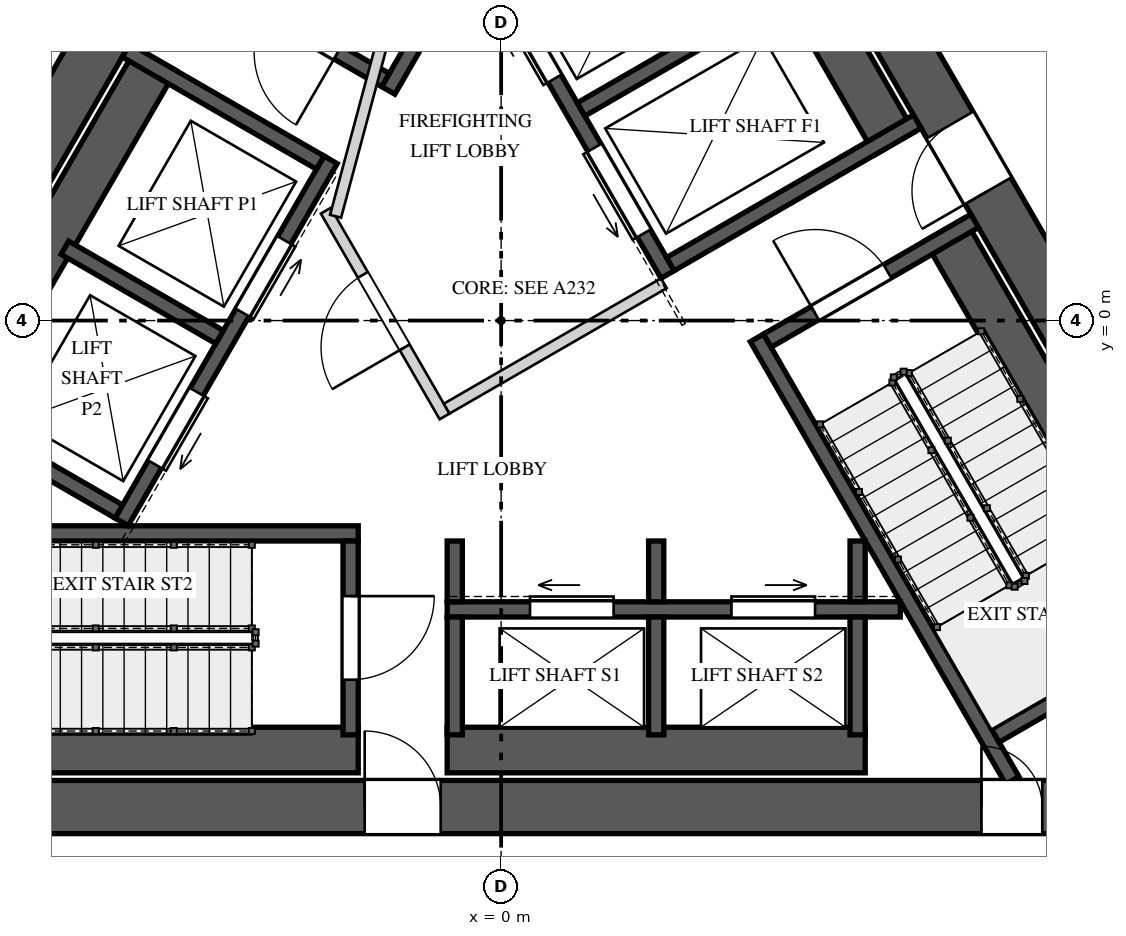
"""IFC4 building model, lengths in metres.
Left out: names, types, materials, properties, quantities, classifications, styles, units other than length and angle.
Written with IfcOpenShell. Run it as: python <this file> out.ifc"""

import sys

from ifc_helpers import new_model, si_unit, direction, frame, frame_2d, origin, place, context, subcontext, project, spatial, rectangle, extrude, element, fill, save


model = new_model("IFC4")
c1 = context("Model", 3, precision=1e-05, world=origin(), true_north=direction((0.0, 1.0)))
c2 = subcontext(c1, "Body", "Model", "MODEL_VIEW")
j1 = project(units=[si_unit("LENGTHUNIT", "METRE"), si_unit("PLANEANGLEUNIT", "RADIAN")], contexts=[c1])
p1 = place(None, origin())
s1 = spatial("IfcSite", under=j1, at=p1, CompositionType="ELEMENT")
p2 = place(p1, origin())
s2 = spatial("IfcBuilding", under=s1, at=p2, CompositionType="ELEMENT")
p3 = place(p2, frame((0.0, 0.0, 237.2)))
s3 = spatial("IfcBuildingStorey", under=s2, at=p3, CompositionType="ELEMENT", Elevation=237.2)
p4 = place(p3, frame((-1.241, 10.65, 0.0), z_axis=(0.0, 0.0, 1.0), x_axis=(-0.500003331888, -0.866023480109, 0.0)))
e1 = element("IfcWall", 1, at=p4, inside=s3, PredefinedType="SHEAR", context=c2, shape_type="SweptSolid", body=[
    extrude(rectangle(XDim=17.205, YDim=0.7, at=frame_2d((8.603, 0.0))), origin(), (0.0, 0.0, 1.0), 4.0),
])
p5 = place(p4, frame((6.808, 0.0, 0.0)))
e2 = element("IfcOpeningElement", 2, at=p5, cuts=e1, PredefinedType="OPENING", context=c2, shape_type="SweptSolid", body=[
    extrude(rectangle(XDim=1.0, YDim=2.4, at=frame_2d((0.5, 1.2))), frame((0.0, 0.36, 0.0), z_axis=(0.0, -1.0, 0.0), x_axis=(1.0, 0.0, 0.0)), (0.0, 0.0, 1.0), 0.72),
])
p6 = place(p4, frame((14.922, 0.0, 0.0)))
e3 = element("IfcOpeningElement", 3, at=p6, cuts=e1, PredefinedType="OPENING", context=c2, shape_type="SweptSolid", body=[
    extrude(rectangle(XDim=0.8, YDim=2.1, at=frame_2d((0.4, 1.05))), frame((0.0, 0.36, 0.0), z_axis=(0.0, -1.0, 0.0), x_axis=(1.0, 0.0, 0.0)), (0.0, 0.0, 1.0), 0.72),
])
p7 = place(p3, frame((-8.603, -6.4, 0.0), z_axis=(0.0, 0.0, 1.0), x_axis=(1.0, 0.0, 0.0)))
e4 = element("IfcWall", 4, at=p7, inside=s3, PredefinedType="SHEAR", context=c2, shape_type="SweptSolid", body=[
    extrude(rectangle(XDim=17.205, YDim=0.7, at=frame_2d((8.603, 0.0))), origin(), (0.0, 0.0, 1.0), 4.0),
])
p8 = place(p7, frame((6.808, 0.0, 0.0)))
e5 = element("IfcOpeningElement", 5, at=p8, cuts=e4, PredefinedType="OPENING", context=c2, shape_type="SweptSolid", body=[
    extrude(rectangle(XDim=1.0, YDim=2.4, at=frame_2d((0.5, 1.2))), frame((0.0, 0.36, 0.0), z_axis=(0.0, -1.0, 0.0), x_axis=(1.0, 0.0, 0.0)), (0.0, 0.0, 1.0), 0.72),
])
p9 = place(p7, frame((14.922, 0.0, 0.0)))
e6 = element("IfcOpeningElement", 6, at=p9, cuts=e4, PredefinedType="OPENING", context=c2, shape_type="SweptSolid", body=[
    extrude(rectangle(XDim=0.8, YDim=2.1, at=frame_2d((0.4, 1.05))), frame((0.0, 0.36, 0.0), z_axis=(0.0, -1.0, 0.0), x_axis=(1.0, 0.0, 0.0)), (0.0, 0.0, 1.0), 0.72),
])
p10 = place(p3, frame((9.844, -4.25, 0.0), z_axis=(0.0, 0.0, 1.0), x_axis=(-0.500003331888, 0.866023480109, 0.0)))
e7 = element("IfcWall", 7, at=p10, inside=s3, PredefinedType="SHEAR", context=c2, shape_type="SweptSolid", body=[
    extrude(rectangle(XDim=17.205, YDim=0.7, at=frame_2d((8.603, 0.0))), origin(), (0.0, 0.0, 1.0), 4.0),
])
p11 = place(p10, frame((6.877, 0.0, 0.0)))
e8 = element("IfcOpeningElement", 8, at=p11, cuts=e7, PredefinedType="OPENING", context=c2, shape_type="SweptSolid", body=[
    extrude(rectangle(XDim=1.0, YDim=2.4, at=frame_2d((0.5, 1.2))), frame((0.0, 0.36, 0.0), z_axis=(0.0, -1.0, 0.0), x_axis=(1.0, 0.0, 0.0)), (0.0, 0.0, 1.0), 0.72),
])
p12 = place(p3, frame((1.876, 8.85, 0.0), z_axis=(0.0, 0.0, 1.0), x_axis=(-0.499998042495, -0.866026533947, 0.0)))
e9 = element("IfcWall", 9, at=p12, inside=s3, PredefinedType="SOLIDWALL", context=c2, shape_type="SweptSolid", body=[
    extrude(rectangle(XDim=6.723, YDim=0.2, at=frame_2d((3.361, 0.0))), origin(), (0.0, 0.0, 1.0), 3.65),
])
p13 = place(p3, frame((-1.521, 3.165, 0.0), z_axis=(0.0, 0.0, 1.0), x_axis=(-0.866035871367, 0.499981869177, 0.0)))
e10 = element("IfcWall", 10, at=p13, inside=s3, PredefinedType="SOLIDWALL", context=c2, shape_type="SweptSolid", body=[
    extrude(rectangle(XDim=3.15, YDim=0.2, at=frame_2d((1.575, 0.0))), origin(), (0.0, 0.0, 1.0), 3.65),
])
p14 = place(p13, frame((0.725, 0.0, 0.0)))
e11 = element("IfcOpeningElement", 11, at=p14, cuts=e10, PredefinedType="OPENING", context=c2, shape_type="SweptSolid", body=[
    extrude(rectangle(XDim=1.1, YDim=2.4, at=frame_2d((0.55, 1.2))), frame((0.0, 0.11, 0.0), z_axis=(0.0, -1.0, 0.0), x_axis=(1.0, 0.0, 0.0)), (0.0, 0.0, 1.0), 0.22),
])
p15 = place(p3, frame((-8.08, -5.65, 0.0), z_axis=(0.0, 0.0, 1.0), x_axis=(1.0, 0.0, 0.0)))
e12 = element("IfcWall", 12, at=p15, inside=s3, PredefinedType="SOLIDWALL", context=c2, shape_type="SweptSolid", body=[
    extrude(rectangle(XDim=6.2, YDim=0.6, at=frame_2d((3.1, 0.0))), origin(), (0.0, 0.0, 1.0), 3.65),
])
p16 = place(p3, frame((-8.603, -2.8, 0.0), z_axis=(0.0, 0.0, 1.0), x_axis=(1.0, 0.0, 0.0)))
e13 = element("IfcWall", 13, at=p16, inside=s3, PredefinedType="SOLIDWALL", context=c2, shape_type="SweptSolid", body=[
    extrude(rectangle(XDim=6.723, YDim=0.2, at=frame_2d((3.361, 0.0))), origin(), (0.0, 0.0, 1.0), 3.65),
])
p17 = place(p3, frame((-1.98, -2.9, 0.0), z_axis=(0.0, 0.0, 1.0), x_axis=(0.0, -1.0, 0.0)))
e14 = element("IfcWall", 14, at=p17, inside=s3, PredefinedType="SOLIDWALL", context=c2, shape_type="SweptSolid", body=[
    extrude(rectangle(XDim=2.55, YDim=0.2, at=frame_2d((1.275, 0.0))), origin(), (0.0, 0.0, 1.0), 3.65),
])
p18 = place(p17, frame((0.725, 0.0, 0.0)))
e15 = element("IfcOpeningElement", 15, at=p18, cuts=e14, PredefinedType="OPENING", context=c2, shape_type="SweptSolid", body=[
    extrude(rectangle(XDim=1.1, YDim=2.4, at=frame_2d((0.55, 1.2))), frame((0.0, 0.11, 0.0), z_axis=(0.0, -1.0, 0.0), x_axis=(1.0, 0.0, 0.0)), (0.0, 0.0, 1.0), 0.22),
])
p19 = place(p3, frame((8.933, -4.172, 0.0), z_axis=(0.0, 0.0, 1.0), x_axis=(-0.500026960575, 0.86600983753, 0.0)))
e16 = element("IfcWall", 16, at=p19, inside=s3, PredefinedType="SOLIDWALL", context=c2, shape_type="SweptSolid", body=[
    extrude(rectangle(XDim=6.2, YDim=0.6, at=frame_2d((3.1, 0.0))), origin(), (0.0, 0.0, 1.0), 3.65),
])
p20 = place(p3, frame((6.726, -6.05, 0.0), z_axis=(0.0, 0.0, 1.0), x_axis=(-0.499970804718, 0.866042259032, 0.0)))
e17 = element("IfcWall", 17, at=p20, inside=s3, PredefinedType="SOLIDWALL", context=c2, shape_type="SweptSolid", body=[
    extrude(rectangle(XDim=6.723, YDim=0.2, at=frame_2d((3.361, 0.0))), origin(), (0.0, 0.0, 1.0), 3.65),
])
p21 = place(p3, frame((6.501, -5.461, 0.0), z_axis=(0.0, 0.0, 1.0), x_axis=(0.866035871367, 0.499981869177, 0.0)))
e18 = element("IfcWall", 18, at=p21, inside=s3, PredefinedType="SOLIDWALL", context=c2, shape_type="SweptSolid", body=[
    extrude(rectangle(XDim=3.15, YDim=0.2, at=frame_2d((1.575, 0.0))), origin(), (0.0, 0.0, 1.0), 3.65),
])
p22 = place(p3, frame((3.501, -0.265, 0.0), z_axis=(0.0, 0.0, 1.0), x_axis=(0.866035871367, 0.499981869177, 0.0)))
e19 = element("IfcWall", 19, at=p22, inside=s3, PredefinedType="SOLIDWALL", context=c2, shape_type="SweptSolid", body=[
    extrude(rectangle(XDim=3.15, YDim=0.2, at=frame_2d((1.575, 0.0))), origin(), (0.0, 0.0, 1.0), 3.65),
])
p23 = place(p22, frame((0.725, 0.0, 0.0)))
e20 = element("IfcOpeningElement", 20, at=p23, cuts=e19, PredefinedType="OPENING", context=c2, shape_type="SweptSolid", body=[
    extrude(rectangle(XDim=1.1, YDim=2.4, at=frame_2d((0.55, 1.2))), frame((0.0, 0.11, 0.0), z_axis=(0.0, -1.0, 0.0), x_axis=(1.0, 0.0, 0.0)), (0.0, 0.0, 1.0), 0.22),
])
p24 = place(p3, frame((-2.243, 2.115, 0.0), z_axis=(0.0, 0.0, 1.0), x_axis=(-0.499996545922, -0.866027397988, 0.0)))
e21 = element("IfcWall", 21, at=p24, inside=s3, PredefinedType="SOLIDWALL", context=c2, shape_type="SweptSolid", body=[
    extrude(rectangle(XDim=5.5, YDim=0.2, at=frame_2d((2.75, 0.0))), origin(), (0.0, 0.0, 1.0), 3.65),
])
p25 = place(p24, frame((1.22, 0.0, 0.0)))
e22 = element("IfcOpeningElement", 22, at=p25, cuts=e21, PredefinedType="OPENING", context=c2, shape_type="SweptSolid", body=[
    extrude(rectangle(XDim=1.1, YDim=2.1, at=frame_2d((0.55, 1.05))), frame((0.0, 0.11, 0.0), z_axis=(0.0, -1.0, 0.0), x_axis=(1.0, 0.0, 0.0)), (0.0, 0.0, 1.0), 0.22),
])
p26 = place(p24, frame((3.525, 0.0, 0.0)))
e23 = element("IfcOpeningElement", 23, at=p26, cuts=e21, PredefinedType="OPENING", context=c2, shape_type="SweptSolid", body=[
    extrude(rectangle(XDim=1.1, YDim=2.1, at=frame_2d((0.55, 1.05))), frame((0.0, 0.11, 0.0), z_axis=(0.0, -1.0, 0.0), x_axis=(1.0, 0.0, 0.0)), (0.0, 0.0, 1.0), 0.22),
])
p27 = place(p3, frame((-4.538, 3.44, 0.0), z_axis=(0.0, 0.0, 1.0), x_axis=(-0.499996545922, -0.866027397988, 0.0)))
e24 = element("IfcWall", 24, at=p27, inside=s3, PredefinedType="SOLIDWALL", context=c2, shape_type="SweptSolid", body=[
    extrude(rectangle(XDim=5.5, YDim=0.6, at=frame_2d((2.75, 0.0))), origin(), (0.0, 0.0, 1.0), 3.65),
])
p28 = place(p3, frame((-2.38, 2.078, 0.0), z_axis=(0.0, 0.0, 1.0), x_axis=(-0.866060182126, 0.499939757307, 0.0)))
e25 = element("IfcWall", 25, at=p28, inside=s3, PredefinedType="SOLIDWALL", context=c2, shape_type="SweptSolid", body=[
    extrude(rectangle(XDim=2.95, YDim=0.2, at=frame_2d((1.475, 0.0))), origin(), (0.0, 0.0, 1.0), 3.65),
])
p29 = place(p3, frame((-3.705, -0.217, 0.0), z_axis=(0.0, 0.0, 1.0), x_axis=(-0.866016039709, 0.500016218704, 0.0)))
e26 = element("IfcWall", 26, at=p29, inside=s3, PredefinedType="SOLIDWALL", context=c2, shape_type="SweptSolid", body=[
    extrude(rectangle(XDim=2.35, YDim=0.2, at=frame_2d((1.175, 0.0))), origin(), (0.0, 0.0, 1.0), 3.65),
])
p30 = place(p3, frame((-5.03, -2.512, 0.0), z_axis=(0.0, 0.0, 1.0), x_axis=(-0.866003658127, 0.500037662692, 0.0)))
e27 = element("IfcWall", 27, at=p30, inside=s3, PredefinedType="SOLIDWALL", context=c2, shape_type="SweptSolid", body=[
    extrude(rectangle(XDim=2.95, YDim=0.2, at=frame_2d((1.475, 0.0))), origin(), (0.0, 0.0, 1.0), 3.65),
])
p31 = place(p3, frame((-0.71, -3.8, 0.0), z_axis=(0.0, 0.0, 1.0), x_axis=(1.0, 0.0, 0.0)))
e28 = element("IfcWall", 28, at=p31, inside=s3, PredefinedType="SOLIDWALL", context=c2, shape_type="SweptSolid", body=[
    extrude(rectangle(XDim=5.961, YDim=0.2, at=frame_2d((2.981, 0.0))), origin(), (0.0, 0.0, 1.0), 3.65),
])
p32 = place(p31, frame((1.09, 0.0, 0.0)))
e29 = element("IfcOpeningElement", 29, at=p32, cuts=e28, PredefinedType="OPENING", context=c2, shape_type="SweptSolid", body=[
    extrude(rectangle(XDim=1.1, YDim=2.1, at=frame_2d((0.55, 1.05))), frame((0.0, 0.11, 0.0), z_axis=(0.0, -1.0, 0.0), x_axis=(1.0, 0.0, 0.0)), (0.0, 0.0, 1.0), 0.22),
])
p33 = place(p31, frame((3.74, 0.0, 0.0)))
e30 = element("IfcOpeningElement", 30, at=p33, cuts=e28, PredefinedType="OPENING", context=c2, shape_type="SweptSolid", body=[
    extrude(rectangle(XDim=1.1, YDim=2.1, at=frame_2d((0.55, 1.05))), frame((0.0, 0.11, 0.0), z_axis=(0.0, -1.0, 0.0), x_axis=(1.0, 0.0, 0.0)), (0.0, 0.0, 1.0), 0.22),
])
p34 = place(p3, frame((-0.71, -5.65, 0.0), z_axis=(0.0, 0.0, 1.0), x_axis=(1.0, 0.0, 0.0)))
e31 = element("IfcWall", 31, at=p34, inside=s3, PredefinedType="SOLIDWALL", context=c2, shape_type="SweptSolid", body=[
    extrude(rectangle(XDim=5.5, YDim=0.6, at=frame_2d((2.75, 0.0))), origin(), (0.0, 0.0, 1.0), 3.65),
])
p35 = place(p3, frame((-0.61, -3.9, 0.0), z_axis=(0.0, 0.0, 1.0), x_axis=(0.0, -1.0, 0.0)))
e32 = element("IfcWall", 32, at=p35, inside=s3, PredefinedType="SOLIDWALL", context=c2, shape_type="SweptSolid", body=[
    extrude(rectangle(XDim=1.55, YDim=0.2, at=frame_2d((0.775, 0.0))), origin(), (0.0, 0.0, 1.0), 3.65),
])
p36 = place(p3, frame((-0.61, -2.9, 0.0), z_axis=(0.0, 0.0, 1.0), x_axis=(0.0, -1.0, 0.0)))
e33 = element("IfcWall", 33, at=p36, inside=s3, PredefinedType="SOLIDWALL", context=c2, shape_type="SweptSolid", body=[
    extrude(rectangle(XDim=0.8, YDim=0.2, at=frame_2d((0.4, 0.0))), origin(), (0.0, 0.0, 1.0), 3.65),
])
p37 = place(p3, frame((2.04, -3.9, 0.0), z_axis=(0.0, 0.0, 1.0), x_axis=(0.0, -1.0, 0.0)))
e34 = element("IfcWall", 34, at=p37, inside=s3, PredefinedType="SOLIDWALL", context=c2, shape_type="SweptSolid", body=[
    extrude(rectangle(XDim=1.55, YDim=0.2, at=frame_2d((0.775, 0.0))), origin(), (0.0, 0.0, 1.0), 3.65),
])
p38 = place(p3, frame((2.04, -2.9, 0.0), z_axis=(0.0, 0.0, 1.0), x_axis=(0.0, -1.0, 0.0)))
e35 = element("IfcWall", 35, at=p38, inside=s3, PredefinedType="SOLIDWALL", context=c2, shape_type="SweptSolid", body=[
    extrude(rectangle(XDim=0.8, YDim=0.2, at=frame_2d((0.4, 0.0))), origin(), (0.0, 0.0, 1.0), 3.65),
])
p39 = place(p3, frame((4.69, -3.9, 0.0), z_axis=(0.0, 0.0, 1.0), x_axis=(0.0, -1.0, 0.0)))
e36 = element("IfcWall", 36, at=p39, inside=s3, PredefinedType="SOLIDWALL", context=c2, shape_type="SweptSolid", body=[
    extrude(rectangle(XDim=1.55, YDim=0.2, at=frame_2d((0.775, 0.0))), origin(), (0.0, 0.0, 1.0), 3.65),
])
p40 = place(p3, frame((4.69, -2.9, 0.0), z_axis=(0.0, 0.0, 1.0), x_axis=(0.0, -1.0, 0.0)))
e37 = element("IfcWall", 37, at=p40, inside=s3, PredefinedType="SOLIDWALL", context=c2, shape_type="SweptSolid", body=[
    extrude(rectangle(XDim=0.8, YDim=0.2, at=frame_2d((0.4, 0.0))), origin(), (0.0, 0.0, 1.0), 3.65),
])
p41 = place(p3, frame((2.19, 0.606, 0.0), z_axis=(0.0, 0.0, 1.0), x_axis=(-0.500002801628, 0.866023786258, 0.0)))
e38 = element("IfcWall", 38, at=p41, inside=s3, PredefinedType="SOLIDWALL", context=c2, shape_type="SweptSolid", body=[
    extrude(rectangle(XDim=4.9, YDim=0.2, at=frame_2d((2.45, 0.0))), origin(), (0.0, 0.0, 1.0), 3.65),
])
p42 = place(p41, frame((0.625, 0.0, 0.0)))
e39 = element("IfcOpeningElement", 39, at=p42, cuts=e38, PredefinedType="OPENING", context=c2, shape_type="SweptSolid", body=[
    extrude(rectangle(XDim=1.3, YDim=2.1, at=frame_2d((0.65, 1.05))), frame((0.0, 0.11, 0.0), z_axis=(0.0, -1.0, 0.0), x_axis=(1.0, 0.0, 0.0)), (0.0, 0.0, 1.0), 0.22),
])
p43 = place(p41, frame((2.975, 0.0, 0.0)))
e40 = element("IfcOpeningElement", 40, at=p43, cuts=e38, PredefinedType="OPENING", context=c2, shape_type="SweptSolid", body=[
    extrude(rectangle(XDim=1.3, YDim=2.1, at=frame_2d((0.65, 1.05))), frame((0.0, 0.11, 0.0), z_axis=(0.0, -1.0, 0.0), x_axis=(1.0, 0.0, 0.0)), (0.0, 0.0, 1.0), 0.22),
])
p44 = place(p3, frame((5.178, 2.331, 0.0), z_axis=(0.0, 0.0, 1.0), x_axis=(-0.49998122708, 0.866036242063, 0.0)))
e41 = element("IfcWall", 41, at=p44, inside=s3, PredefinedType="SOLIDWALL", context=c2, shape_type="SweptSolid", body=[
    extrude(rectangle(XDim=4.9, YDim=0.6, at=frame_2d((2.45, 0.0))), origin(), (0.0, 0.0, 1.0), 3.65),
])
p45 = place(p3, frame((2.227, 0.743, 0.0), z_axis=(0.0, 0.0, 1.0), x_axis=(0.866022959057, 0.500004234368, 0.0)))
e42 = element("IfcWall", 42, at=p45, inside=s3, PredefinedType="SOLIDWALL", context=c2, shape_type="SweptSolid", body=[
    extrude(rectangle(XDim=3.75, YDim=0.2, at=frame_2d((1.875, 0.0))), origin(), (0.0, 0.0, 1.0), 3.65),
])
p46 = place(p3, frame((1.052, 2.778, 0.0), z_axis=(0.0, 0.0, 1.0), x_axis=(0.866039234136, 0.499976044363, 0.0)))
e43 = element("IfcWall", 43, at=p46, inside=s3, PredefinedType="SOLIDWALL", context=c2, shape_type="SweptSolid", body=[
    extrude(rectangle(XDim=3.75, YDim=0.2, at=frame_2d((1.875, 0.0))), origin(), (0.0, 0.0, 1.0), 3.65),
])
p47 = place(p3, frame((-0.744, -1.261, 0.0), z_axis=(0.0, 0.0, 1.0), x_axis=(-0.500004234368, 0.866022959057, 0.0)))
e44 = element("IfcWall", 44, at=p47, inside=s3, PredefinedType="PARTITIONING", context=c2, shape_type="SweptSolid", body=[
    extrude(rectangle(XDim=3.125, YDim=0.15, at=frame_2d((1.562, 0.0))), origin(), (0.0, 0.0, 1.0), 3.65),
])
p48 = place(p47, frame((1.05, 0.0, 0.0)))
e45 = element("IfcOpeningElement", 45, at=p48, cuts=e44, PredefinedType="OPENING", context=c2, shape_type="SweptSolid", body=[
    extrude(rectangle(XDim=1.1, YDim=2.4, at=frame_2d((0.55, 1.2))), frame((0.0, 0.085, 0.0), z_axis=(0.0, -1.0, 0.0), x_axis=(1.0, 0.0, 0.0)), (0.0, 0.0, 1.0), 0.17),
])
p49 = place(p3, frame((-0.717, -1.159, 0.0), z_axis=(0.0, 0.0, 1.0), x_axis=(0.866008176907, 0.50002983664, 0.0)))
e46 = element("IfcWall", 46, at=p49, inside=s3, PredefinedType="PARTITIONING", context=c2, shape_type="SweptSolid", body=[
    extrude(rectangle(XDim=3.3, YDim=0.15, at=frame_2d((1.65, 0.0))), origin(), (0.0, 0.0, 1.0), 3.65),
])
p50 = place(p3, frame((-2.178, 1.372, 0.0), z_axis=(0.0, 0.0, 1.0), x_axis=(0.258808958833, 0.96592852884, 0.0)))
e47 = element("IfcWall", 47, at=p50, inside=s3, PredefinedType="PARTITIONING", context=c2, shape_type="SweptSolid", body=[
    extrude(rectangle(XDim=2.903, YDim=0.15, at=frame_2d((1.451, 0.0))), origin(), (0.0, 0.0, 1.0), 3.65),
])
p51 = place(p14, origin())
e48 = element("IfcDoor", 48, at=p51, inside=s3, OperationType="SINGLE_SWING_RIGHT", PredefinedType="DOOR", context=c2, shape_type="SweptSolid", body=[
    extrude(rectangle(XDim=1.1, YDim=2.4, at=frame_2d((0.55, 1.2))), frame((0.0, 0.025, 0.0), z_axis=(0.0, -1.0, 0.0), x_axis=(1.0, 0.0, 0.0)), (0.0, 0.0, 1.0), 0.05),
])
fill(e11, e48)
p52 = place(p18, origin())
e49 = element("IfcDoor", 49, at=p52, inside=s3, OperationType="SINGLE_SWING_LEFT", PredefinedType="DOOR", context=c2, shape_type="SweptSolid", body=[
    extrude(rectangle(XDim=1.1, YDim=2.4, at=frame_2d((0.55, 1.2))), frame((0.0, 0.025, 0.0), z_axis=(0.0, -1.0, 0.0), x_axis=(1.0, 0.0, 0.0)), (0.0, 0.0, 1.0), 0.05),
])
fill(e15, e49)
p53 = place(p23, origin())
e50 = element("IfcDoor", 50, at=p53, inside=s3, OperationType="SINGLE_SWING_RIGHT", PredefinedType="DOOR", context=c2, shape_type="SweptSolid", body=[
    extrude(rectangle(XDim=1.1, YDim=2.4, at=frame_2d((0.55, 1.2))), frame((0.0, 0.025, 0.0), z_axis=(0.0, -1.0, 0.0), x_axis=(1.0, 0.0, 0.0)), (0.0, 0.0, 1.0), 0.05),
])
fill(e20, e50)
p54 = place(p25, origin())
e51 = element("IfcDoor", 51, at=p54, inside=s3, OperationType="SLIDING_TO_LEFT", PredefinedType="DOOR", context=c2, shape_type="SweptSolid", body=[
    extrude(rectangle(XDim=1.1, YDim=2.1, at=frame_2d((0.55, 1.05))), frame((0.0, 0.025, 0.0), z_axis=(0.0, -1.0, 0.0), x_axis=(1.0, 0.0, 0.0)), (0.0, 0.0, 1.0), 0.05),
])
fill(e22, e51)
p55 = place(p26, origin())
e52 = element("IfcDoor", 52, at=p55, inside=s3, OperationType="SLIDING_TO_RIGHT", PredefinedType="DOOR", context=c2, shape_type="SweptSolid", body=[
    extrude(rectangle(XDim=1.1, YDim=2.1, at=frame_2d((0.55, 1.05))), frame((0.0, 0.025, 0.0), z_axis=(0.0, -1.0, 0.0), x_axis=(1.0, 0.0, 0.0)), (0.0, 0.0, 1.0), 0.05),
])
fill(e23, e52)
p56 = place(p32, origin())
e53 = element("IfcDoor", 53, at=p56, inside=s3, OperationType="SLIDING_TO_LEFT", PredefinedType="DOOR", context=c2, shape_type="SweptSolid", body=[
    extrude(rectangle(XDim=1.1, YDim=2.1, at=frame_2d((0.55, 1.05))), frame((0.0, 0.025, 0.0), z_axis=(0.0, -1.0, 0.0), x_axis=(1.0, 0.0, 0.0)), (0.0, 0.0, 1.0), 0.05),
])
fill(e29, e53)
p57 = place(p33, origin())
e54 = element("IfcDoor", 54, at=p57, inside=s3, OperationType="SLIDING_TO_RIGHT", PredefinedType="DOOR", context=c2, shape_type="SweptSolid", body=[
    extrude(rectangle(XDim=1.1, YDim=2.1, at=frame_2d((0.55, 1.05))), frame((0.0, 0.025, 0.0), z_axis=(0.0, -1.0, 0.0), x_axis=(1.0, 0.0, 0.0)), (0.0, 0.0, 1.0), 0.05),
])
fill(e30, e54)
p58 = place(p42, origin())
e55 = element("IfcDoor", 55, at=p58, inside=s3, OperationType="SLIDING_TO_LEFT", PredefinedType="DOOR", context=c2, shape_type="SweptSolid", body=[
    extrude(rectangle(XDim=1.3, YDim=2.1, at=frame_2d((0.65, 1.05))), frame((0.0, 0.025, 0.0), z_axis=(0.0, -1.0, 0.0), x_axis=(1.0, 0.0, 0.0)), (0.0, 0.0, 1.0), 0.05),
])
fill(e39, e55)
p59 = place(p43, origin())
e56 = element("IfcDoor", 56, at=p59, inside=s3, OperationType="SLIDING_TO_RIGHT", PredefinedType="DOOR", context=c2, shape_type="SweptSolid", body=[
    extrude(rectangle(XDim=1.3, YDim=2.1, at=frame_2d((0.65, 1.05))), frame((0.0, 0.025, 0.0), z_axis=(0.0, -1.0, 0.0), x_axis=(1.0, 0.0, 0.0)), (0.0, 0.0, 1.0), 0.05),
])
fill(e40, e56)
p60 = place(p48, origin())
e57 = element("IfcDoor", 57, at=p60, inside=s3, OperationType="SINGLE_SWING_LEFT", PredefinedType="DOOR", context=c2, shape_type="SweptSolid", body=[
    extrude(rectangle(XDim=1.1, YDim=2.4, at=frame_2d((0.55, 1.2))), frame((0.0, 0.025, 0.0), z_axis=(0.0, -1.0, 0.0), x_axis=(1.0, 0.0, 0.0)), (0.0, 0.0, 1.0), 0.05),
])
fill(e45, e57)
p61 = place(p8, origin())
e58 = element("IfcDoor", 58, at=p61, inside=s3, OperationType="SINGLE_SWING_LEFT", PredefinedType="DOOR", context=c2, shape_type="SweptSolid", body=[
    extrude(rectangle(XDim=1.0, YDim=2.4, at=frame_2d((0.5, 1.2))), frame((0.0, 0.025, 0.0), z_axis=(0.0, -1.0, 0.0), x_axis=(1.0, 0.0, 0.0)), (0.0, 0.0, 1.0), 0.05),
])
fill(e5, e58)
p62 = place(p11, origin())
e59 = element("IfcDoor", 59, at=p62, inside=s3, OperationType="SINGLE_SWING_RIGHT", PredefinedType="DOOR", context=c2, shape_type="SweptSolid", body=[
    extrude(rectangle(XDim=1.0, YDim=2.4, at=frame_2d((0.5, 1.2))), frame((0.0, 0.025, 0.0), z_axis=(0.0, -1.0, 0.0), x_axis=(1.0, 0.0, 0.0)), (0.0, 0.0, 1.0), 0.05),
])
fill(e8, e59)
p63 = place(p9, origin())
e60 = element("IfcDoor", 60, at=p63, inside=s3, OperationType="SINGLE_SWING_RIGHT", PredefinedType="DOOR", context=c2, shape_type="SweptSolid", body=[
    extrude(rectangle(XDim=0.8, YDim=2.1, at=frame_2d((0.4, 1.05))), frame((0.0, 0.025, 0.0), z_axis=(0.0, -1.0, 0.0), x_axis=(1.0, 0.0, 0.0)), (0.0, 0.0, 1.0), 0.05),
])
fill(e6, e60)
save(model, sys.argv[1])
